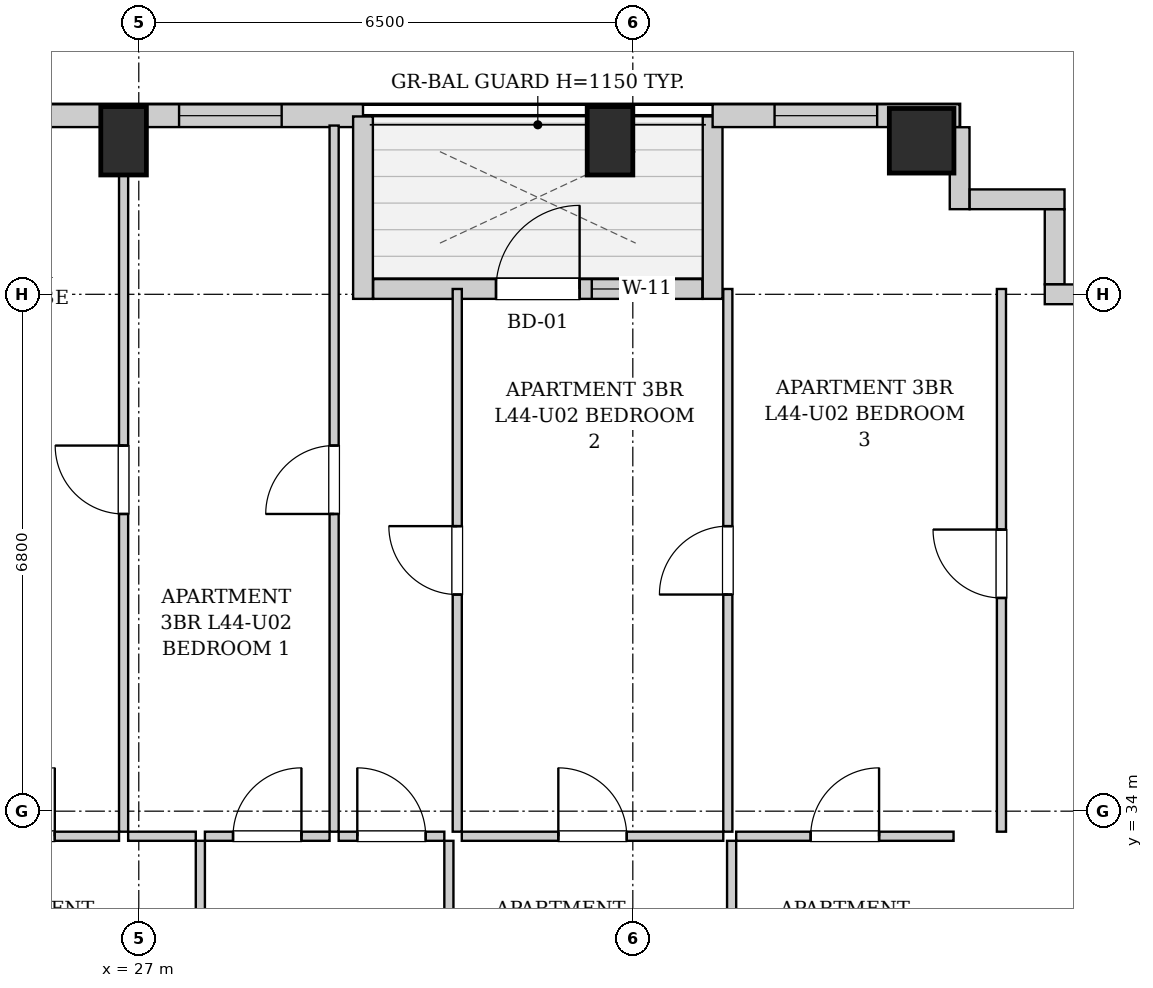
"""IFC4 building model, lengths in metres.
Left out: names, types, materials, properties, quantities, classifications, styles, units other than length and angle.
Written with IfcOpenShell. Run it as: python <this file> out.ifc"""

import sys

from ifc_helpers import new_model, si_unit, direction, frame, frame_2d, origin, origin_2d, place, context, subcontext, project, spatial, rectangle, extrude, element, fill, save


model = new_model("IFC4")
c1 = context("Model", 3, precision=1e-05, world=origin(), true_north=direction((0.0, 1.0)))
c2 = subcontext(c1, "Body", "Model", "MODEL_VIEW")
j1 = project(units=[si_unit("LENGTHUNIT", "METRE"), si_unit("PLANEANGLEUNIT", "RADIAN")], contexts=[c1])
p1 = place(None, origin())
s1 = spatial("IfcSite", under=j1, at=p1, CompositionType="ELEMENT")
p2 = place(p1, origin())
s2 = spatial("IfcBuilding", under=s1, at=p2, CompositionType="ELEMENT")
p3 = place(p2, frame((0.0, 0.0, 153.65)))
s3 = spatial("IfcBuildingStorey", under=s2, at=p3, CompositionType="ELEMENT", Elevation=153.65)
for number, where, z_axis, x_axis in (
    (1, (26.8, 42.82, 0.0), (0.0, 0.0, 1.0), (1.0, 0.0, 0.0)),
    (2, (33.2, 42.82, 0.0), (0.0, 0.0, 1.0), (1.0, 0.0, 0.0)),
):
    element("IfcColumn", number, at=place(p3, frame(where, z_axis=z_axis, x_axis=x_axis)), inside=s3, PredefinedType="COLUMN", context=c2, shape_type="SweptSolid", body=[
        extrude(rectangle(XDim=0.6, YDim=0.9, at=origin_2d()), origin(), (0.0, 0.0, 1.0), 3.25),
    ])
p4 = place(p3, frame((37.3, 42.82, 0.0), z_axis=(0.0, 0.0, 1.0), x_axis=(1.0, 0.0, 0.0)))
e3 = element("IfcColumn", 3, at=p4, inside=s3, PredefinedType="COLUMN", context=c2, shape_type="SweptSolid", body=[
    extrude(rectangle(XDim=0.85, YDim=0.85, at=origin_2d()), origin(), (0.0, 0.0, 1.0), 3.25),
])
p5 = place(p3, frame((16.6, 43.15, 0.0), z_axis=(0.0, 0.0, 1.0), x_axis=(1.0, 0.0, 0.0)))
e4 = element("IfcWall", 4, at=p5, inside=s3, PredefinedType="SOLIDWALL", context=c2, shape_type="SweptSolid", body=[
    extrude(rectangle(XDim=13.35, YDim=0.3, at=frame_2d((6.675, 0.0))), origin(), (0.0, 0.0, 1.0), 2.99),
])
p6 = place(p5, frame((3.269, 0.0, 0.55)))
e5 = element("IfcOpeningElement", 5, at=p6, cuts=e4, PredefinedType="OPENING", context=c2, shape_type="SweptSolid", body=[
    extrude(rectangle(XDim=1.35, YDim=1.2, at=frame_2d((0.675, 0.6))), frame((0.0, 0.16, 0.0), z_axis=(0.0, -1.0, 0.0), x_axis=(1.0, 0.0, 0.0)), (0.0, 0.0, 1.0), 0.32),
])
p7 = place(p5, frame((10.93, 0.0, 0.55)))
e6 = element("IfcOpeningElement", 6, at=p7, cuts=e4, PredefinedType="OPENING", context=c2, shape_type="SweptSolid", body=[
    extrude(rectangle(XDim=1.35, YDim=1.2, at=frame_2d((0.675, 0.6))), frame((0.0, 0.16, 0.0), z_axis=(0.0, -1.0, 0.0), x_axis=(1.0, 0.0, 0.0)), (0.0, 0.0, 1.0), 0.32),
])
p8 = place(p3, frame((29.95, 43.14, 0.0), z_axis=(0.0, 0.0, 1.0), x_axis=(0.0, -1.0, 0.0)))
e7 = element("IfcWall", 7, at=p8, inside=s3, PredefinedType="SOLIDWALL", context=c2, shape_type="SweptSolid", body=[
    extrude(rectangle(XDim=2.4, YDim=0.26, at=frame_2d((1.2, 0.0))), origin(), (0.0, 0.0, 1.0), 2.99),
])
p9 = place(p3, frame((30.084, 40.87, 0.0), z_axis=(0.0, 0.0, 1.0), x_axis=(1.0, 0.0, 0.0)))
e8 = element("IfcWall", 8, at=p9, inside=s3, PredefinedType="SOLIDWALL", context=c2, shape_type="SweptSolid", body=[
    extrude(rectangle(XDim=4.332, YDim=0.26, at=frame_2d((2.166, 0.0))), origin(), (0.0, 0.0, 1.0), 2.99),
])
p10 = place(p9, frame((1.616, 0.0, 0.0)))
e9 = element("IfcOpeningElement", 9, at=p10, cuts=e8, PredefinedType="OPENING", context=c2, shape_type="SweptSolid", body=[
    extrude(rectangle(XDim=1.1, YDim=2.0, at=frame_2d((0.55, 1.0))), frame((0.0, 0.14, 0.0), z_axis=(0.0, -1.0, 0.0), x_axis=(1.0, 0.0, 0.0)), (0.0, 0.0, 1.0), 0.28),
])
p11 = place(p9, frame((2.876, 0.0, 0.55)))
e10 = element("IfcOpeningElement", 10, at=p11, cuts=e8, PredefinedType="OPENING", context=c2, shape_type="SweptSolid", body=[
    extrude(rectangle(XDim=0.85, YDim=1.2, at=frame_2d((0.425, 0.6))), frame((0.0, 0.14, 0.0), z_axis=(0.0, -1.0, 0.0), x_axis=(1.0, 0.0, 0.0)), (0.0, 0.0, 1.0), 0.28),
])
p12 = place(p3, frame((34.55, 40.74, 0.0), z_axis=(0.0, 0.0, 1.0), x_axis=(0.0, 1.0, 0.0)))
e11 = element("IfcWall", 11, at=p12, inside=s3, PredefinedType="SOLIDWALL", context=c2, shape_type="SweptSolid", body=[
    extrude(rectangle(XDim=2.4, YDim=0.26, at=frame_2d((1.2, 0.0))), origin(), (0.0, 0.0, 1.0), 2.99),
])
p13 = place(p3, frame((34.55, 43.15, 0.0), z_axis=(0.0, 0.0, 1.0), x_axis=(1.0, 0.0, 0.0)))
e12 = element("IfcWall", 12, at=p13, inside=s3, PredefinedType="SOLIDWALL", context=c2, shape_type="SweptSolid", body=[
    extrude(rectangle(XDim=3.25, YDim=0.3, at=frame_2d((1.625, 0.0))), origin(), (0.0, 0.0, 1.0), 2.99),
])
p14 = place(p13, frame((0.815, 0.0, 0.55)))
e13 = element("IfcOpeningElement", 13, at=p14, cuts=e12, PredefinedType="OPENING", context=c2, shape_type="SweptSolid", body=[
    extrude(rectangle(XDim=1.35, YDim=1.2, at=frame_2d((0.675, 0.6))), frame((0.0, 0.16, 0.0), z_axis=(0.0, -1.0, 0.0), x_axis=(1.0, 0.0, 0.0)), (0.0, 0.0, 1.0), 0.32),
])
p15 = place(p3, frame((37.8, 42.998, 0.0), z_axis=(0.0, 0.0, 1.0), x_axis=(0.0, -1.0, 0.0)))
e14 = element("IfcWall", 14, at=p15, inside=s3, PredefinedType="SOLIDWALL", context=c2, shape_type="SweptSolid", body=[
    extrude(rectangle(XDim=1.078, YDim=0.26, at=frame_2d((0.539, 0.0))), origin(), (0.0, 0.0, 1.0), 2.99),
])
p16 = place(p3, frame((37.932, 42.05, 0.0), z_axis=(0.0, 0.0, 1.0), x_axis=(1.0, 0.0, 0.0)))
e15 = element("IfcWall", 15, at=p16, inside=s3, PredefinedType="SOLIDWALL", context=c2, shape_type="SweptSolid", body=[
    extrude(rectangle(XDim=1.248, YDim=0.26, at=frame_2d((0.624, 0.0))), origin(), (0.0, 0.0, 1.0), 2.99),
])
p17 = place(p3, frame((39.05, 41.918, 0.0), z_axis=(0.0, 0.0, 1.0), x_axis=(0.0, -1.0, 0.0)))
e16 = element("IfcWall", 16, at=p17, inside=s3, PredefinedType="SOLIDWALL", context=c2, shape_type="SweptSolid", body=[
    extrude(rectangle(XDim=0.986, YDim=0.26, at=frame_2d((0.493, 0.0))), origin(), (0.0, 0.0, 1.0), 2.99),
])
p18 = place(p3, frame((38.92, 40.8, 0.0), z_axis=(0.0, 0.0, 1.0), x_axis=(1.0, 0.0, 0.0)))
e17 = element("IfcWall", 17, at=p18, inside=s3, PredefinedType="SOLIDWALL", context=c2, shape_type="SweptSolid", body=[
    extrude(rectangle(XDim=1.078, YDim=0.26, at=frame_2d((0.539, 0.0))), origin(), (0.0, 0.0, 1.0), 2.99),
])
p19 = place(p3, frame((27.81, 30.76, 0.0), z_axis=(0.0, 0.0, 1.0), x_axis=(0.0, 1.0, 0.0)))
e18 = element("IfcWall", 18, at=p19, inside=s3, PredefinedType="PARTITIONING", context=c2, shape_type="SweptSolid", body=[
    extrude(rectangle(XDim=2.85, YDim=0.12, at=frame_2d((1.425, 0.0))), origin(), (0.0, 0.0, 1.0), 2.99),
])
p20 = place(p19, frame((0.975, 0.0, 0.0)))
e19 = element("IfcOpeningElement", 19, at=p20, cuts=e18, PredefinedType="OPENING", context=c2, shape_type="SweptSolid", body=[
    extrude(rectangle(XDim=0.9, YDim=2.05, at=frame_2d((0.45, 1.025))), frame((0.0, 0.07, 0.0), z_axis=(0.0, -1.0, 0.0), x_axis=(1.0, 0.0, 0.0)), (0.0, 0.0, 1.0), 0.14),
])
p21 = place(p3, frame((24.15, 33.67, 0.0), z_axis=(0.0, 0.0, 1.0), x_axis=(1.0, 0.0, 0.0)))
e20 = element("IfcWall", 20, at=p21, inside=s3, PredefinedType="PARTITIONING", context=c2, shape_type="SweptSolid", body=[
    extrude(rectangle(XDim=2.59, YDim=0.12, at=frame_2d((1.295, 0.0))), origin(), (0.0, 0.0, 1.0), 2.99),
])
p22 = place(p21, frame((0.845, 0.0, 0.0)))
e21 = element("IfcOpeningElement", 21, at=p22, cuts=e20, PredefinedType="OPENING", context=c2, shape_type="SweptSolid", body=[
    extrude(rectangle(XDim=0.9, YDim=2.05, at=frame_2d((0.45, 1.025))), frame((0.0, 0.07, 0.0), z_axis=(0.0, -1.0, 0.0), x_axis=(1.0, 0.0, 0.0)), (0.0, 0.0, 1.0), 0.14),
])
p23 = place(p3, frame((26.86, 33.67, 0.0), z_axis=(0.0, 0.0, 1.0), x_axis=(1.0, 0.0, 0.0)))
e22 = element("IfcWall", 22, at=p23, inside=s3, PredefinedType="PARTITIONING", context=c2, shape_type="SweptSolid", body=[
    extrude(rectangle(XDim=0.89, YDim=0.12, at=frame_2d((0.445, 0.0))), origin(), (0.0, 0.0, 1.0), 2.99),
])
p24 = place(p3, frame((31.08, 30.76, 0.0), z_axis=(0.0, 0.0, 1.0), x_axis=(0.0, 1.0, 0.0)))
e23 = element("IfcWall", 23, at=p24, inside=s3, PredefinedType="PARTITIONING", context=c2, shape_type="SweptSolid", body=[
    extrude(rectangle(XDim=2.85, YDim=0.12, at=frame_2d((1.425, 0.0))), origin(), (0.0, 0.0, 1.0), 2.99),
])
p25 = place(p24, frame((0.975, 0.0, 0.0)))
e24 = element("IfcOpeningElement", 24, at=p25, cuts=e23, PredefinedType="OPENING", context=c2, shape_type="SweptSolid", body=[
    extrude(rectangle(XDim=0.9, YDim=2.05, at=frame_2d((0.45, 1.025))), frame((0.0, 0.07, 0.0), z_axis=(0.0, -1.0, 0.0), x_axis=(1.0, 0.0, 0.0)), (0.0, 0.0, 1.0), 0.14),
])
p26 = place(p3, frame((27.87, 33.67, 0.0), z_axis=(0.0, 0.0, 1.0), x_axis=(1.0, 0.0, 0.0)))
e25 = element("IfcWall", 25, at=p26, inside=s3, PredefinedType="PARTITIONING", context=c2, shape_type="SweptSolid", body=[
    extrude(rectangle(XDim=1.64, YDim=0.12, at=frame_2d((0.82, 0.0))), origin(), (0.0, 0.0, 1.0), 2.99),
])
p27 = place(p26, frame((0.37, 0.0, 0.0)))
e26 = element("IfcOpeningElement", 26, at=p27, cuts=e25, PredefinedType="OPENING", context=c2, shape_type="SweptSolid", body=[
    extrude(rectangle(XDim=0.9, YDim=2.05, at=frame_2d((0.45, 1.025))), frame((0.0, 0.07, 0.0), z_axis=(0.0, -1.0, 0.0), x_axis=(1.0, 0.0, 0.0)), (0.0, 0.0, 1.0), 0.14),
])
p28 = place(p3, frame((29.63, 33.67, 0.0), z_axis=(0.0, 0.0, 1.0), x_axis=(1.0, 0.0, 0.0)))
e27 = element("IfcWall", 27, at=p28, inside=s3, PredefinedType="PARTITIONING", context=c2, shape_type="SweptSolid", body=[
    extrude(rectangle(XDim=1.39, YDim=0.12, at=frame_2d((0.695, 0.0))), origin(), (0.0, 0.0, 1.0), 2.99),
])
p29 = place(p28, frame((0.245, 0.0, 0.0)))
e28 = element("IfcOpeningElement", 28, at=p29, cuts=e27, PredefinedType="OPENING", context=c2, shape_type="SweptSolid", body=[
    extrude(rectangle(XDim=0.9, YDim=2.05, at=frame_2d((0.45, 1.025))), frame((0.0, 0.07, 0.0), z_axis=(0.0, -1.0, 0.0), x_axis=(1.0, 0.0, 0.0)), (0.0, 0.0, 1.0), 0.14),
])
p30 = place(p3, frame((34.8, 30.76, 0.0), z_axis=(0.0, 0.0, 1.0), x_axis=(0.0, 1.0, 0.0)))
e29 = element("IfcWall", 29, at=p30, inside=s3, PredefinedType="PARTITIONING", context=c2, shape_type="SweptSolid", body=[
    extrude(rectangle(XDim=2.85, YDim=0.12, at=frame_2d((1.425, 0.0))), origin(), (0.0, 0.0, 1.0), 2.99),
])
p31 = place(p30, frame((0.975, 0.0, 0.0)))
e30 = element("IfcOpeningElement", 30, at=p31, cuts=e29, PredefinedType="OPENING", context=c2, shape_type="SweptSolid", body=[
    extrude(rectangle(XDim=0.9, YDim=2.05, at=frame_2d((0.45, 1.025))), frame((0.0, 0.07, 0.0), z_axis=(0.0, -1.0, 0.0), x_axis=(1.0, 0.0, 0.0)), (0.0, 0.0, 1.0), 0.14),
])
p32 = place(p3, frame((31.25, 33.67, 0.0), z_axis=(0.0, 0.0, 1.0), x_axis=(1.0, 0.0, 0.0)))
e31 = element("IfcWall", 31, at=p32, inside=s3, PredefinedType="PARTITIONING", context=c2, shape_type="SweptSolid", body=[
    extrude(rectangle(XDim=3.44, YDim=0.12, at=frame_2d((1.72, 0.0))), origin(), (0.0, 0.0, 1.0), 2.99),
])
p33 = place(p32, frame((1.27, 0.0, 0.0)))
e32 = element("IfcOpeningElement", 32, at=p33, cuts=e31, PredefinedType="OPENING", context=c2, shape_type="SweptSolid", body=[
    extrude(rectangle(XDim=0.9, YDim=2.05, at=frame_2d((0.45, 1.025))), frame((0.0, 0.07, 0.0), z_axis=(0.0, -1.0, 0.0), x_axis=(1.0, 0.0, 0.0)), (0.0, 0.0, 1.0), 0.14),
])
p34 = place(p3, frame((34.86, 33.67, 0.0), z_axis=(0.0, 0.0, 1.0), x_axis=(1.0, 0.0, 0.0)))
e33 = element("IfcWall", 33, at=p34, inside=s3, PredefinedType="PARTITIONING", context=c2, shape_type="SweptSolid", body=[
    extrude(rectangle(XDim=2.86, YDim=0.12, at=frame_2d((1.43, 0.0))), origin(), (0.0, 0.0, 1.0), 2.99),
])
p35 = place(p34, frame((0.98, 0.0, 0.0)))
e34 = element("IfcOpeningElement", 34, at=p35, cuts=e33, PredefinedType="OPENING", context=c2, shape_type="SweptSolid", body=[
    extrude(rectangle(XDim=0.9, YDim=2.05, at=frame_2d((0.45, 1.025))), frame((0.0, 0.07, 0.0), z_axis=(0.0, -1.0, 0.0), x_axis=(1.0, 0.0, 0.0)), (0.0, 0.0, 1.0), 0.14),
])
p36 = place(p3, frame((26.8, 33.73, 0.0), z_axis=(0.0, 0.0, 1.0), x_axis=(0.0, 1.0, 0.0)))
e35 = element("IfcWall", 35, at=p36, inside=s3, PredefinedType="PARTITIONING", context=c2, shape_type="SweptSolid", body=[
    extrude(rectangle(XDim=9.29, YDim=0.12, at=frame_2d((4.645, 0.0))), origin(), (0.0, 0.0, 1.0), 2.99),
])
p37 = place(p36, frame((4.18, 0.0, 0.0)))
e36 = element("IfcOpeningElement", 36, at=p37, cuts=e35, PredefinedType="OPENING", context=c2, shape_type="SweptSolid", body=[
    extrude(rectangle(XDim=0.9, YDim=2.05, at=frame_2d((0.45, 1.025))), frame((0.0, 0.07, 0.0), z_axis=(0.0, -1.0, 0.0), x_axis=(1.0, 0.0, 0.0)), (0.0, 0.0, 1.0), 0.14),
])
p38 = place(p3, frame((29.57, 33.73, 0.0), z_axis=(0.0, 0.0, 1.0), x_axis=(0.0, 1.0, 0.0)))
e37 = element("IfcWall", 37, at=p38, inside=s3, PredefinedType="PARTITIONING", context=c2, shape_type="SweptSolid", body=[
    extrude(rectangle(XDim=9.29, YDim=0.12, at=frame_2d((4.645, 0.0))), origin(), (0.0, 0.0, 1.0), 2.99),
])
p39 = place(p38, frame((4.18, 0.0, 0.0)))
e38 = element("IfcOpeningElement", 38, at=p39, cuts=e37, PredefinedType="OPENING", context=c2, shape_type="SweptSolid", body=[
    extrude(rectangle(XDim=0.9, YDim=2.05, at=frame_2d((0.45, 1.025))), frame((0.0, 0.07, 0.0), z_axis=(0.0, -1.0, 0.0), x_axis=(1.0, 0.0, 0.0)), (0.0, 0.0, 1.0), 0.14),
])
p40 = place(p3, frame((31.19, 33.73, 0.0), z_axis=(0.0, 0.0, 1.0), x_axis=(0.0, 1.0, 0.0)))
e39 = element("IfcWall", 39, at=p40, inside=s3, PredefinedType="PARTITIONING", context=c2, shape_type="SweptSolid", body=[
    extrude(rectangle(XDim=7.14, YDim=0.12, at=frame_2d((3.57, 0.0))), origin(), (0.0, 0.0, 1.0), 2.99),
])
p41 = place(p40, frame((3.12, 0.0, 0.0)))
e40 = element("IfcOpeningElement", 40, at=p41, cuts=e39, PredefinedType="OPENING", context=c2, shape_type="SweptSolid", body=[
    extrude(rectangle(XDim=0.9, YDim=2.05, at=frame_2d((0.45, 1.025))), frame((0.0, 0.07, 0.0), z_axis=(0.0, -1.0, 0.0), x_axis=(1.0, 0.0, 0.0)), (0.0, 0.0, 1.0), 0.14),
])
p42 = place(p3, frame((34.75, 33.73, 0.0), z_axis=(0.0, 0.0, 1.0), x_axis=(0.0, 1.0, 0.0)))
e41 = element("IfcWall", 41, at=p42, inside=s3, PredefinedType="PARTITIONING", context=c2, shape_type="SweptSolid", body=[
    extrude(rectangle(XDim=7.14, YDim=0.12, at=frame_2d((3.57, 0.0))), origin(), (0.0, 0.0, 1.0), 2.99),
])
p43 = place(p42, frame((3.12, 0.0, 0.0)))
e42 = element("IfcOpeningElement", 42, at=p43, cuts=e41, PredefinedType="OPENING", context=c2, shape_type="SweptSolid", body=[
    extrude(rectangle(XDim=0.9, YDim=2.05, at=frame_2d((0.45, 1.025))), frame((0.0, 0.07, 0.0), z_axis=(0.0, -1.0, 0.0), x_axis=(1.0, 0.0, 0.0)), (0.0, 0.0, 1.0), 0.14),
])
p44 = place(p3, frame((38.35, 33.73, 0.0), z_axis=(0.0, 0.0, 1.0), x_axis=(0.0, 1.0, 0.0)))
e43 = element("IfcWall", 43, at=p44, inside=s3, PredefinedType="PARTITIONING", context=c2, shape_type="SweptSolid", body=[
    extrude(rectangle(XDim=7.14, YDim=0.12, at=frame_2d((3.57, 0.0))), origin(), (0.0, 0.0, 1.0), 2.99),
])
p45 = place(p44, frame((3.075, 0.0, 0.0)))
e44 = element("IfcOpeningElement", 44, at=p45, cuts=e43, PredefinedType="OPENING", context=c2, shape_type="SweptSolid", body=[
    extrude(rectangle(XDim=0.9, YDim=2.05, at=frame_2d((0.45, 1.025))), frame((0.0, 0.07, 0.0), z_axis=(0.0, -1.0, 0.0), x_axis=(1.0, 0.0, 0.0)), (0.0, 0.0, 1.0), 0.14),
])
p46 = place(p22, origin())
e45 = element("IfcDoor", 45, at=p46, inside=s3, OperationType="SINGLE_SWING_RIGHT", PredefinedType="DOOR", context=c2, shape_type="SweptSolid", body=[
    extrude(rectangle(XDim=0.9, YDim=2.05, at=frame_2d((0.45, 1.025))), frame((0.0, 0.025, 0.0), z_axis=(0.0, -1.0, 0.0), x_axis=(1.0, 0.0, 0.0)), (0.0, 0.0, 1.0), 0.05),
])
fill(e21, e45)
p47 = place(p27, origin())
e46 = element("IfcDoor", 46, at=p47, inside=s3, OperationType="SINGLE_SWING_RIGHT", PredefinedType="DOOR", context=c2, shape_type="SweptSolid", body=[
    extrude(rectangle(XDim=0.9, YDim=2.05, at=frame_2d((0.45, 1.025))), frame((0.0, 0.025, 0.0), z_axis=(0.0, -1.0, 0.0), x_axis=(1.0, 0.0, 0.0)), (0.0, 0.0, 1.0), 0.05),
])
fill(e26, e46)
p48 = place(p29, origin())
e47 = element("IfcDoor", 47, at=p48, inside=s3, OperationType="SINGLE_SWING_LEFT", PredefinedType="DOOR", context=c2, shape_type="SweptSolid", body=[
    extrude(rectangle(XDim=0.9, YDim=2.05, at=frame_2d((0.45, 1.025))), frame((0.0, 0.025, 0.0), z_axis=(0.0, -1.0, 0.0), x_axis=(1.0, 0.0, 0.0)), (0.0, 0.0, 1.0), 0.05),
])
fill(e28, e47)
p49 = place(p33, origin())
e48 = element("IfcDoor", 48, at=p49, inside=s3, OperationType="SINGLE_SWING_LEFT", PredefinedType="DOOR", context=c2, shape_type="SweptSolid", body=[
    extrude(rectangle(XDim=0.9, YDim=2.05, at=frame_2d((0.45, 1.025))), frame((0.0, 0.025, 0.0), z_axis=(0.0, -1.0, 0.0), x_axis=(1.0, 0.0, 0.0)), (0.0, 0.0, 1.0), 0.05),
])
fill(e32, e48)
p50 = place(p35, origin())
e49 = element("IfcDoor", 49, at=p50, inside=s3, OperationType="SINGLE_SWING_RIGHT", PredefinedType="DOOR", context=c2, shape_type="SweptSolid", body=[
    extrude(rectangle(XDim=0.9, YDim=2.05, at=frame_2d((0.45, 1.025))), frame((0.0, 0.025, 0.0), z_axis=(0.0, -1.0, 0.0), x_axis=(1.0, 0.0, 0.0)), (0.0, 0.0, 1.0), 0.05),
])
fill(e34, e49)
p51 = place(p37, origin())
e50 = element("IfcDoor", 50, at=p51, inside=s3, OperationType="SINGLE_SWING_RIGHT", PredefinedType="DOOR", context=c2, shape_type="SweptSolid", body=[
    extrude(rectangle(XDim=0.9, YDim=2.05, at=frame_2d((0.45, 1.025))), frame((0.0, 0.025, 0.0), z_axis=(0.0, -1.0, 0.0), x_axis=(1.0, 0.0, 0.0)), (0.0, 0.0, 1.0), 0.05),
])
fill(e36, e50)
p52 = place(p39, origin())
e51 = element("IfcDoor", 51, at=p52, inside=s3, OperationType="SINGLE_SWING_LEFT", PredefinedType="DOOR", context=c2, shape_type="SweptSolid", body=[
    extrude(rectangle(XDim=0.9, YDim=2.05, at=frame_2d((0.45, 1.025))), frame((0.0, 0.025, 0.0), z_axis=(0.0, -1.0, 0.0), x_axis=(1.0, 0.0, 0.0)), (0.0, 0.0, 1.0), 0.05),
])
fill(e38, e51)
p53 = place(p41, origin())
e52 = element("IfcDoor", 52, at=p53, inside=s3, OperationType="SINGLE_SWING_RIGHT", PredefinedType="DOOR", context=c2, shape_type="SweptSolid", body=[
    extrude(rectangle(XDim=0.9, YDim=2.05, at=frame_2d((0.45, 1.025))), frame((0.0, 0.025, 0.0), z_axis=(0.0, -1.0, 0.0), x_axis=(1.0, 0.0, 0.0)), (0.0, 0.0, 1.0), 0.05),
])
fill(e40, e52)
p54 = place(p43, origin())
e53 = element("IfcDoor", 53, at=p54, inside=s3, OperationType="SINGLE_SWING_LEFT", PredefinedType="DOOR", context=c2, shape_type="SweptSolid", body=[
    extrude(rectangle(XDim=0.9, YDim=2.05, at=frame_2d((0.45, 1.025))), frame((0.0, 0.025, 0.0), z_axis=(0.0, -1.0, 0.0), x_axis=(1.0, 0.0, 0.0)), (0.0, 0.0, 1.0), 0.05),
])
fill(e42, e53)
p55 = place(p45, origin())
e54 = element("IfcDoor", 54, at=p55, inside=s3, OperationType="SINGLE_SWING_RIGHT", PredefinedType="DOOR", context=c2, shape_type="SweptSolid", body=[
    extrude(rectangle(XDim=0.9, YDim=2.05, at=frame_2d((0.45, 1.025))), frame((0.0, 0.025, 0.0), z_axis=(0.0, -1.0, 0.0), x_axis=(1.0, 0.0, 0.0)), (0.0, 0.0, 1.0), 0.05),
])
fill(e44, e54)
p56 = place(p10, origin())
e55 = element("IfcDoor", 55, at=p56, inside=s3, OperationType="SINGLE_SWING_RIGHT", PredefinedType="DOOR", context=c2, shape_type="SweptSolid", body=[
    extrude(rectangle(XDim=1.1, YDim=2.0, at=frame_2d((0.55, 1.0))), frame((0.0, 0.025, 0.0), z_axis=(0.0, -1.0, 0.0), x_axis=(1.0, 0.0, 0.0)), (0.0, 0.0, 1.0), 0.05),
])
fill(e9, e55)
p57 = place(p7, origin())
e56 = element("IfcWindow", 56, at=p57, inside=s3, PartitioningType="SINGLE_PANEL", PredefinedType="WINDOW", context=c2, shape_type="SweptSolid", body=[
    extrude(rectangle(XDim=1.35, YDim=1.2, at=frame_2d((0.675, 0.6))), frame((0.0, 0.03, 0.0), z_axis=(0.0, -1.0, 0.0), x_axis=(1.0, 0.0, 0.0)), (0.0, 0.0, 1.0), 0.06),
])
fill(e6, e56)
p58 = place(p11, origin())
e57 = element("IfcWindow", 57, at=p58, inside=s3, PartitioningType="SINGLE_PANEL", PredefinedType="WINDOW", context=c2, shape_type="SweptSolid", body=[
    extrude(rectangle(XDim=0.85, YDim=1.2, at=frame_2d((0.425, 0.6))), frame((0.0, 0.03, 0.0), z_axis=(0.0, -1.0, 0.0), x_axis=(1.0, 0.0, 0.0)), (0.0, 0.0, 1.0), 0.06),
])
fill(e10, e57)
p59 = place(p14, origin())
e58 = element("IfcWindow", 58, at=p59, inside=s3, PartitioningType="SINGLE_PANEL", PredefinedType="WINDOW", context=c2, shape_type="SweptSolid", body=[
    extrude(rectangle(XDim=1.35, YDim=1.2, at=frame_2d((0.675, 0.6))), frame((0.0, 0.03, 0.0), z_axis=(0.0, -1.0, 0.0), x_axis=(1.0, 0.0, 0.0)), (0.0, 0.0, 1.0), 0.06),
])
fill(e13, e58)
save(model, sys.argv[1])
